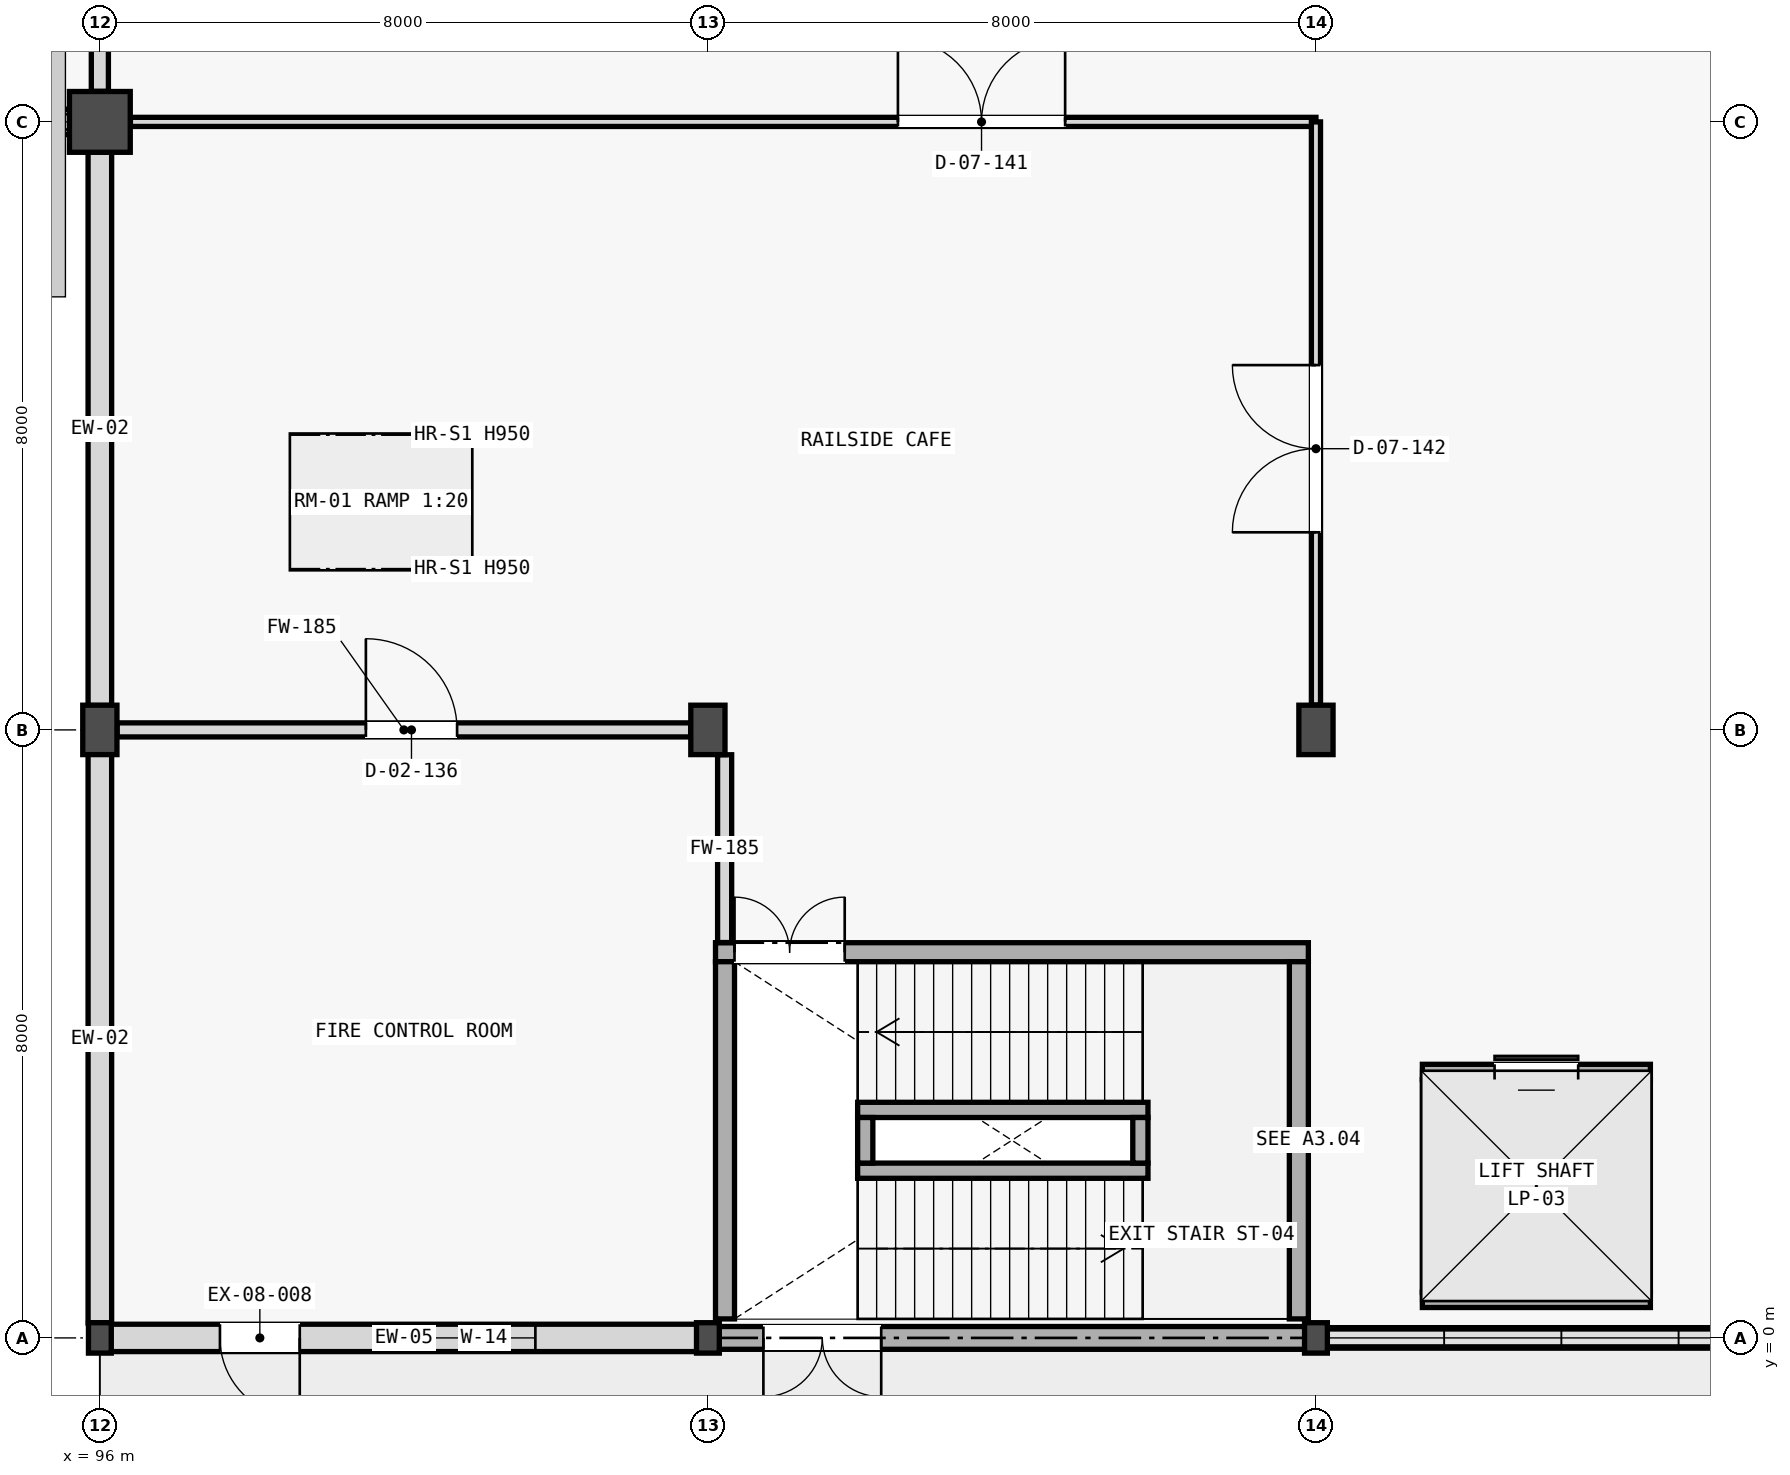
"""IFC4 building model, lengths in metres.
Left out: names, types, materials, properties, quantities, classifications, styles, units other than length and angle.
Written with IfcOpenShell. Run it as: python <this file> out.ifc"""

import sys

from ifc_helpers import new_model, si_unit, direction, frame, frame_2d, origin, origin_2d, place, context, subcontext, project, spatial, rectangle, i_section, extrude, element, fill, save


model = new_model("IFC4")
c1 = context("Model", 3, precision=1e-05, world=origin(), true_north=direction((0.0, 1.0)))
c2 = subcontext(c1, "Body", "Model", "MODEL_VIEW")
j1 = project(units=[si_unit("LENGTHUNIT", "METRE"), si_unit("PLANEANGLEUNIT", "RADIAN")], contexts=[c1])
p1 = place(None, origin())
s1 = spatial("IfcSite", under=j1, at=p1, CompositionType="ELEMENT")
p2 = place(p1, origin())
s2 = spatial("IfcBuilding", under=s1, at=p2, CompositionType="ELEMENT")
p3 = place(p2, origin())
s3 = spatial("IfcBuildingStorey", under=s2, at=p3, CompositionType="ELEMENT", Elevation=0.0)
p4 = place(p3, frame((96.0, 16.0, 0.0), z_axis=(0.0, 0.0, 1.0), x_axis=(1.0, 0.0, 0.0)))
e1 = element("IfcColumn", 1, at=p4, inside=s3, PredefinedType="COLUMN", context=c2, shape_type="SweptSolid", body=[
    extrude(rectangle(XDim=0.8, YDim=0.8, at=origin_2d()), origin(), (0.0, 0.0, 1.0), 5.125),
])
p5 = place(p3, frame((96.0, 0.0, 0.0), z_axis=(0.0, 0.0, 1.0), x_axis=(1.0, 0.0, 0.0)))
e2 = element("IfcColumn", 2, at=p5, inside=s3, PredefinedType="COLUMN", context=c2, shape_type="SweptSolid", body=[
    extrude(i_section(OverallWidth=0.3, OverallDepth=0.4, WebThickness=0.013, FlangeThickness=0.024, at=origin_2d()), origin(), (0.0, 0.0, 1.0), 5.125),
])
p6 = place(p3, frame((96.0, 8.0, 0.0), z_axis=(0.0, 0.0, 1.0), x_axis=(1.0, 0.0, 0.0)))
e3 = element("IfcColumn", 3, at=p6, inside=s3, PredefinedType="COLUMN", context=c2, shape_type="SweptSolid", body=[
    extrude(rectangle(XDim=0.45, YDim=0.65, at=origin_2d()), origin(), (0.0, 0.0, 1.0), 5.125),
])
p7 = place(p3, frame((104.0, 0.0, 0.0), z_axis=(0.0, 0.0, 1.0), x_axis=(1.0, 0.0, 0.0)))
e4 = element("IfcColumn", 4, at=p7, inside=s3, PredefinedType="COLUMN", context=c2, shape_type="SweptSolid", body=[
    extrude(i_section(OverallWidth=0.3, OverallDepth=0.4, WebThickness=0.013, FlangeThickness=0.024, at=origin_2d()), origin(), (0.0, 0.0, 1.0), 5.125),
])
p8 = place(p3, frame((104.0, 8.0, 0.0), z_axis=(0.0, 0.0, 1.0), x_axis=(1.0, 0.0, 0.0)))
e5 = element("IfcColumn", 5, at=p8, inside=s3, PredefinedType="COLUMN", context=c2, shape_type="SweptSolid", body=[
    extrude(rectangle(XDim=0.45, YDim=0.65, at=origin_2d()), origin(), (0.0, 0.0, 1.0), 5.125),
])
p9 = place(p3, frame((112.0, 0.0, 0.0), z_axis=(0.0, 0.0, 1.0), x_axis=(1.0, 0.0, 0.0)))
e6 = element("IfcColumn", 6, at=p9, inside=s3, PredefinedType="COLUMN", context=c2, shape_type="SweptSolid", body=[
    extrude(i_section(OverallWidth=0.3, OverallDepth=0.4, WebThickness=0.013, FlangeThickness=0.024, at=origin_2d()), origin(), (0.0, 0.0, 1.0), 5.125),
])
p10 = place(p3, frame((112.0, 8.0, 0.0), z_axis=(0.0, 0.0, 1.0), x_axis=(1.0, 0.0, 0.0)))
e7 = element("IfcColumn", 7, at=p10, inside=s3, PredefinedType="COLUMN", context=c2, shape_type="SweptSolid", body=[
    extrude(rectangle(XDim=0.45, YDim=0.65, at=origin_2d()), origin(), (0.0, 0.0, 1.0), 5.125),
])
p11 = place(p3, frame((92.14, 16.0, 0.0), z_axis=(0.0, 0.0, 1.0), x_axis=(1.0, 0.0, 0.0)))
e8 = element("IfcWall", 8, at=p11, inside=s3, PredefinedType="STANDARD", context=c2, shape_type="SweptSolid", body=[
    extrude(rectangle(XDim=3.464, YDim=0.33, at=frame_2d((1.732, 0.0))), origin(), (0.0, 0.0, 1.0), 0.65),
])
p12 = place(p3, frame((92.14, 16.0, 2.549), z_axis=(0.0, 0.0, 1.0), x_axis=(1.0, 0.0, 0.0)))
e9 = element("IfcWall", 9, at=p12, inside=s3, PredefinedType="STANDARD", context=c2, shape_type="SweptSolid", body=[
    extrude(rectangle(XDim=3.464, YDim=0.33, at=frame_2d((1.732, 0.0))), origin(), (0.0, 0.0, 1.0), 1.756),
])
p13 = place(p3, frame((96.146, 0.0, 0.0), z_axis=(0.0, 0.0, 1.0), x_axis=(1.0, 0.0, 0.0)))
e10 = element("IfcWall", 10, at=p13, inside=s3, PredefinedType="STANDARD", context=c2, shape_type="SweptSolid", body=[
    extrude(rectangle(XDim=7.708, YDim=0.36, at=frame_2d((3.854, 0.0))), origin(), (0.0, 0.0, 1.0), 4.25),
])
p14 = place(p13, frame((1.434, 0.0, 0.0)))
e11 = element("IfcOpeningElement", 11, at=p14, cuts=e10, PredefinedType="OPENING", context=c2, shape_type="SweptSolid", body=[
    extrude(rectangle(XDim=1.05, YDim=2.2, at=frame_2d((0.525, 1.1))), frame((0.0, 0.19, 0.0), z_axis=(0.0, -1.0, 0.0), x_axis=(1.0, 0.0, 0.0)), (0.0, 0.0, 1.0), 0.38),
])
p15 = place(p13, frame((4.234, 0.0, 1.1)))
e12 = element("IfcOpeningElement", 12, at=p15, cuts=e10, PredefinedType="OPENING", context=c2, shape_type="SweptSolid", body=[
    extrude(rectangle(XDim=1.35, YDim=1.65, at=frame_2d((0.675, 0.825))), frame((0.0, 0.19, 0.0), z_axis=(0.0, -1.0, 0.0), x_axis=(1.0, 0.0, 0.0)), (0.0, 0.0, 1.0), 0.38),
])
p16 = place(p3, frame((104.146, 0.0, 0.0), z_axis=(0.0, 0.0, 1.0), x_axis=(1.0, 0.0, 0.0)))
e13 = element("IfcWall", 13, at=p16, inside=s3, PredefinedType="SHEAR", context=c2, shape_type="SweptSolid", body=[
    extrude(rectangle(XDim=7.708, YDim=0.3, at=frame_2d((3.854, 0.0))), origin(), (0.0, 0.0, 1.0), 5.4),
])
p17 = place(p16, frame((0.584, 0.0, 0.0)))
e14 = element("IfcOpeningElement", 14, at=p17, cuts=e13, PredefinedType="OPENING", context=c2, shape_type="SweptSolid", body=[
    extrude(rectangle(XDim=1.55, YDim=2.2, at=frame_2d((0.775, 1.1))), frame((0.0, 0.16, 0.0), z_axis=(0.0, -1.0, 0.0), x_axis=(1.0, 0.0, 0.0)), (0.0, 0.0, 1.0), 0.32),
])
p18 = place(p3, frame((112.146, 0.0, 0.0), z_axis=(0.0, 0.0, 1.0), x_axis=(1.0, 0.0, 0.0)))
e15 = element("IfcWall", 15, at=p18, inside=s3, PredefinedType="STANDARD", context=c2, shape_type="SweptSolid", body=[
    extrude(rectangle(XDim=7.708, YDim=0.27, at=frame_2d((3.854, 0.0))), origin(), (0.0, 0.0, 1.0), 0.8),
])
p19 = place(p3, frame((96.0, 0.196, 0.0), z_axis=(0.0, 0.0, 1.0), x_axis=(0.0, 1.0, 0.0)))
e16 = element("IfcWall", 16, at=p19, inside=s3, PredefinedType="STANDARD", context=c2, shape_type="SweptSolid", body=[
    extrude(rectangle(XDim=7.483, YDim=0.31, at=frame_2d((3.741, 0.0))), origin(), (0.0, 0.0, 1.0), 4.305),
])
p20 = place(p3, frame((96.0, 8.321, 0.0), z_axis=(0.0, 0.0, 1.0), x_axis=(0.0, 1.0, 0.0)))
e17 = element("IfcWall", 17, at=p20, inside=s3, PredefinedType="STANDARD", context=c2, shape_type="SweptSolid", body=[
    extrude(rectangle(XDim=7.283, YDim=0.31, at=frame_2d((3.642, 0.0))), origin(), (0.0, 0.0, 1.0), 4.45),
])
p21 = place(p3, frame((104.1, 5.075, 0.0), z_axis=(0.0, 0.0, 1.0), x_axis=(1.0, 0.0, 0.0)))
e18 = element("IfcWall", 18, at=p21, inside=s3, PredefinedType="SHEAR", context=c2, shape_type="SweptSolid", body=[
    extrude(rectangle(XDim=7.8, YDim=0.25, at=frame_2d((3.9, 0.0))), origin(), (0.0, 0.0, 1.0), 5.4),
])
p22 = place(p21, frame((0.25, 0.0, 0.0)))
e19 = element("IfcOpeningElement", 19, at=p22, cuts=e18, PredefinedType="OPENING", context=c2, shape_type="SweptSolid", body=[
    extrude(rectangle(XDim=1.45, YDim=2.2, at=frame_2d((0.725, 1.1))), frame((0.0, 0.135, 0.0), z_axis=(0.0, -1.0, 0.0), x_axis=(1.0, 0.0, 0.0)), (0.0, 0.0, 1.0), 0.27),
])
for number, where, z_axis, x_axis in (
    (20, (104.225, 0.25, 0.0), (0.0, 0.0, 1.0), (0.0, 1.0, 0.0)),
    (21, (111.775, 0.25, 0.0), (0.0, 0.0, 1.0), (0.0, 1.0, 0.0)),
):
    element("IfcWall", number, at=place(p3, frame(where, z_axis=z_axis, x_axis=x_axis)), inside=s3, PredefinedType="SHEAR", context=c2, shape_type="SweptSolid", body=[
        extrude(rectangle(XDim=4.7, YDim=0.25, at=frame_2d((2.35, 0.0))), origin(), (0.0, 0.0, 1.0), 5.4),
    ])
for number, where, z_axis, x_axis in (
    (22, (105.97, 2.2, 0.0), (0.0, 0.0, 1.0), (1.0, 0.0, 0.0)),
    (23, (105.97, 3.0, 0.0), (0.0, 0.0, 1.0), (1.0, 0.0, 0.0)),
):
    element("IfcWall", number, at=place(p3, frame(where, z_axis=z_axis, x_axis=x_axis)), inside=s3, PredefinedType="SHEAR", context=c2, shape_type="SweptSolid", body=[
        extrude(rectangle(XDim=3.82, YDim=0.2, at=frame_2d((1.91, 0.0))), origin(), (0.0, 0.0, 1.0), 5.4),
    ])
for number, where, z_axis, x_axis in (
    (24, (106.07, 2.3, 0.0), (0.0, 0.0, 1.0), (0.0, 1.0, 0.0)),
    (25, (109.69, 2.3, 0.0), (0.0, 0.0, 1.0), (0.0, 1.0, 0.0)),
):
    element("IfcWall", number, at=place(p3, frame(where, z_axis=z_axis, x_axis=x_axis)), inside=s3, PredefinedType="SHEAR", context=c2, shape_type="SweptSolid", body=[
        extrude(rectangle(XDim=0.6, YDim=0.2, at=frame_2d((0.3, 0.0))), origin(), (0.0, 0.0, 1.0), 5.4),
    ])
p23 = place(p3, frame((113.4, 0.5, 0.0), z_axis=(0.0, 0.0, 1.0), x_axis=(1.0, 0.0, 0.0)))
e26 = element("IfcWall", 26, at=p23, inside=s3, PredefinedType="SHEAR", context=c2, shape_type="SweptSolid", body=[
    extrude(rectangle(XDim=3.0, YDim=0.2, at=frame_2d((1.5, 0.0))), origin(), (0.0, 0.0, 1.0), 5.4),
])
p24 = place(p3, frame((113.4, 3.5, 0.0), z_axis=(0.0, 0.0, 1.0), x_axis=(1.0, 0.0, 0.0)))
e27 = element("IfcWall", 27, at=p24, inside=s3, PredefinedType="SHEAR", context=c2, shape_type="SweptSolid", body=[
    extrude(rectangle(XDim=3.0, YDim=0.2, at=frame_2d((1.5, 0.0))), origin(), (0.0, 0.0, 1.0), 5.4),
])
p25 = place(p24, frame((0.95, 0.0, 0.0)))
e28 = element("IfcOpeningElement", 28, at=p25, cuts=e27, PredefinedType="OPENING", context=c2, shape_type="SweptSolid", body=[
    extrude(rectangle(XDim=1.1, YDim=2.2, at=frame_2d((0.55, 1.1))), frame((0.0, 0.11, 0.0), z_axis=(0.0, -1.0, 0.0), x_axis=(1.0, 0.0, 0.0)), (0.0, 0.0, 1.0), 0.22),
])
for number, where, z_axis, x_axis in (
    (29, (113.5, 0.6, 0.0), (0.0, 0.0, 1.0), (0.0, 1.0, 0.0)),
    (30, (116.3, 0.6, 0.0), (0.0, 0.0, 1.0), (0.0, 1.0, 0.0)),
):
    element("IfcWall", number, at=place(p3, frame(where, z_axis=z_axis, x_axis=x_axis)), inside=s3, PredefinedType="SHEAR", context=c2, shape_type="SweptSolid", body=[
        extrude(rectangle(XDim=2.8, YDim=0.2, at=frame_2d((1.4, 0.0))), origin(), (0.0, 0.0, 1.0), 5.4),
    ])
p26 = place(p3, frame((96.0, 16.402, 0.0), z_axis=(0.0, 0.0, 1.0), x_axis=(0.0, 1.0, 0.0)))
e31 = element("IfcWall", 31, at=p26, inside=s3, PredefinedType="STANDARD", context=c2, shape_type="SweptSolid", body=[
    extrude(rectangle(XDim=7.196, YDim=0.225, at=frame_2d((3.598, 0.0))), origin(), (0.0, 0.0, 1.0), 4.555),
])
p27 = place(p26, frame((2.698, 0.0, 0.0)))
e32 = element("IfcOpeningElement", 32, at=p27, cuts=e31, PredefinedType="OPENING", context=c2, shape_type="SweptSolid", body=[
    extrude(rectangle(XDim=1.8, YDim=2.3, at=frame_2d((0.9, 1.15))), frame((0.0, 0.123, 0.0), z_axis=(0.0, -1.0, 0.0), x_axis=(1.0, 0.0, 0.0)), (0.0, 0.0, 1.0), 0.245),
])
p28 = place(p3, frame((96.227, 8.0, 0.0), z_axis=(0.0, 0.0, 1.0), x_axis=(1.0, 0.0, 0.0)))
e33 = element("IfcWall", 33, at=p28, inside=s3, PredefinedType="STANDARD", context=c2, shape_type="SweptSolid", body=[
    extrude(rectangle(XDim=7.546, YDim=0.185, at=frame_2d((3.773, 0.0))), origin(), (0.0, 0.0, 1.0), 4.305),
])
p29 = place(p28, frame((3.273, 0.0, 0.0)))
e34 = element("IfcOpeningElement", 34, at=p29, cuts=e33, PredefinedType="OPENING", context=c2, shape_type="SweptSolid", body=[
    extrude(rectangle(XDim=1.2, YDim=2.2, at=frame_2d((0.6, 1.1))), frame((0.0, 0.103, 0.0), z_axis=(0.0, -1.0, 0.0), x_axis=(1.0, 0.0, 0.0)), (0.0, 0.0, 1.0), 0.205),
])
p30 = place(p3, frame((104.22, 5.202, 0.0), z_axis=(0.0, 0.0, 1.0), x_axis=(0.0, 1.0, 0.0)))
e35 = element("IfcWall", 35, at=p30, inside=s3, PredefinedType="STANDARD", context=c2, shape_type="SweptSolid", body=[
    extrude(rectangle(XDim=2.471, YDim=0.185, at=frame_2d((1.236, 0.0))), origin(), (0.0, 0.0, 1.0), 4.305),
])
p31 = place(p3, frame((96.402, 16.0, 0.0), z_axis=(0.0, 0.0, 1.0), x_axis=(1.0, 0.0, 0.0)))
e36 = element("IfcWall", 36, at=p31, inside=s3, PredefinedType="PARTITIONING", context=c2, shape_type="SweptSolid", body=[
    extrude(rectangle(XDim=15.598, YDim=0.12, at=frame_2d((7.799, 0.0))), origin(), (0.0, 0.0, 1.0), 3.755),
])
p32 = place(p31, frame((10.098, 0.0, 0.0)))
e37 = element("IfcOpeningElement", 37, at=p32, cuts=e36, PredefinedType="OPENING", context=c2, shape_type="SweptSolid", body=[
    extrude(rectangle(XDim=2.2, YDim=2.4, at=frame_2d((1.1, 1.2))), frame((0.0, 0.07, 0.0), z_axis=(0.0, -1.0, 0.0), x_axis=(1.0, 0.0, 0.0)), (0.0, 0.0, 1.0), 0.14),
])
p33 = place(p3, frame((112.0, 8.327, 0.0), z_axis=(0.0, 0.0, 1.0), x_axis=(0.0, 1.0, 0.0)))
e38 = element("IfcWall", 38, at=p33, inside=s3, PredefinedType="PARTITIONING", context=c2, shape_type="SweptSolid", body=[
    extrude(rectangle(XDim=7.673, YDim=0.12, at=frame_2d((3.836, 0.0))), origin(), (0.0, 0.0, 1.0), 3.755),
])
p34 = place(p33, frame((2.273, 0.0, 0.0)))
e39 = element("IfcOpeningElement", 39, at=p34, cuts=e38, PredefinedType="OPENING", context=c2, shape_type="SweptSolid", body=[
    extrude(rectangle(XDim=2.2, YDim=2.4, at=frame_2d((1.1, 1.2))), frame((0.0, 0.07, 0.0), z_axis=(0.0, -1.0, 0.0), x_axis=(1.0, 0.0, 0.0)), (0.0, 0.0, 1.0), 0.14),
])
p35 = place(p14, frame((1.05, 0.0, 0.0), z_axis=(0.0, 0.0, 1.0), x_axis=(-1.0, 0.0, 0.0)))
e40 = element("IfcDoor", 40, at=p35, inside=s3, OperationType="SINGLE_SWING_LEFT", PredefinedType="DOOR", context=c2, shape_type="SweptSolid", body=[
    extrude(rectangle(XDim=1.05, YDim=2.2, at=frame_2d((0.525, 1.1))), frame((0.0, 0.025, 0.0), z_axis=(0.0, -1.0, 0.0), x_axis=(1.0, 0.0, 0.0)), (0.0, 0.0, 1.0), 0.05),
])
fill(e11, e40)
p36 = place(p15, origin())
e41 = element("IfcWindow", 41, at=p36, inside=s3, PartitioningType="SINGLE_PANEL", PredefinedType="WINDOW", context=c2, shape_type="SweptSolid", body=[
    extrude(rectangle(XDim=1.35, YDim=1.65, at=frame_2d((0.675, 0.825))), frame((0.0, 0.03, 0.0), z_axis=(0.0, -1.0, 0.0), x_axis=(1.0, 0.0, 0.0)), (0.0, 0.0, 1.0), 0.06),
])
fill(e12, e41)
p37 = place(p17, frame((1.55, 0.0, 0.0), z_axis=(0.0, 0.0, 1.0), x_axis=(-1.0, 0.0, 0.0)))
e42 = element("IfcDoor", 42, at=p37, inside=s3, OperationType="DOUBLE_DOOR_SINGLE_SWING", PredefinedType="DOOR", context=c2, shape_type="SweptSolid", body=[
    extrude(rectangle(XDim=1.55, YDim=2.2, at=frame_2d((0.775, 1.1))), frame((0.0, 0.025, 0.0), z_axis=(0.0, -1.0, 0.0), x_axis=(1.0, 0.0, 0.0)), (0.0, 0.0, 1.0), 0.05),
])
fill(e14, e42)
p38 = place(p22, origin())
e43 = element("IfcDoor", 43, at=p38, inside=s3, OperationType="DOUBLE_DOOR_SINGLE_SWING", PredefinedType="DOOR", context=c2, shape_type="SweptSolid", body=[
    extrude(rectangle(XDim=1.45, YDim=2.2, at=frame_2d((0.725, 1.1))), frame((0.0, 0.025, 0.0), z_axis=(0.0, -1.0, 0.0), x_axis=(1.0, 0.0, 0.0)), (0.0, 0.0, 1.0), 0.05),
])
fill(e19, e43)
p39 = place(p25, origin())
e44 = element("IfcDoor", 44, at=p39, inside=s3, OperationType="SLIDING_TO_LEFT", PredefinedType="DOOR", context=c2, shape_type="SweptSolid", body=[
    extrude(rectangle(XDim=1.1, YDim=2.2, at=frame_2d((0.55, 1.1))), frame((0.0, 0.025, 0.0), z_axis=(0.0, -1.0, 0.0), x_axis=(1.0, 0.0, 0.0)), (0.0, 0.0, 1.0), 0.05),
])
fill(e28, e44)
p40 = place(p29, origin())
e45 = element("IfcDoor", 45, at=p40, inside=s3, OperationType="SINGLE_SWING_LEFT", PredefinedType="DOOR", context=c2, shape_type="SweptSolid", body=[
    extrude(rectangle(XDim=1.2, YDim=2.2, at=frame_2d((0.6, 1.1))), frame((0.0, 0.025, 0.0), z_axis=(0.0, -1.0, 0.0), x_axis=(1.0, 0.0, 0.0)), (0.0, 0.0, 1.0), 0.05),
])
fill(e34, e45)
p41 = place(p32, origin())
e46 = element("IfcDoor", 46, at=p41, inside=s3, OperationType="DOUBLE_DOOR_SINGLE_SWING", PredefinedType="DOOR", context=c2, shape_type="SweptSolid", body=[
    extrude(rectangle(XDim=2.2, YDim=2.4, at=frame_2d((1.1, 1.2))), frame((0.0, 0.025, 0.0), z_axis=(0.0, -1.0, 0.0), x_axis=(1.0, 0.0, 0.0)), (0.0, 0.0, 1.0), 0.05),
])
fill(e37, e46)
p42 = place(p34, origin())
e47 = element("IfcDoor", 47, at=p42, inside=s3, OperationType="DOUBLE_DOOR_SINGLE_SWING", PredefinedType="DOOR", context=c2, shape_type="SweptSolid", body=[
    extrude(rectangle(XDim=2.2, YDim=2.4, at=frame_2d((1.1, 1.2))), frame((0.0, 0.025, 0.0), z_axis=(0.0, -1.0, 0.0), x_axis=(1.0, 0.0, 0.0)), (0.0, 0.0, 1.0), 0.05),
])
fill(e39, e47)
save(model, sys.argv[1])
